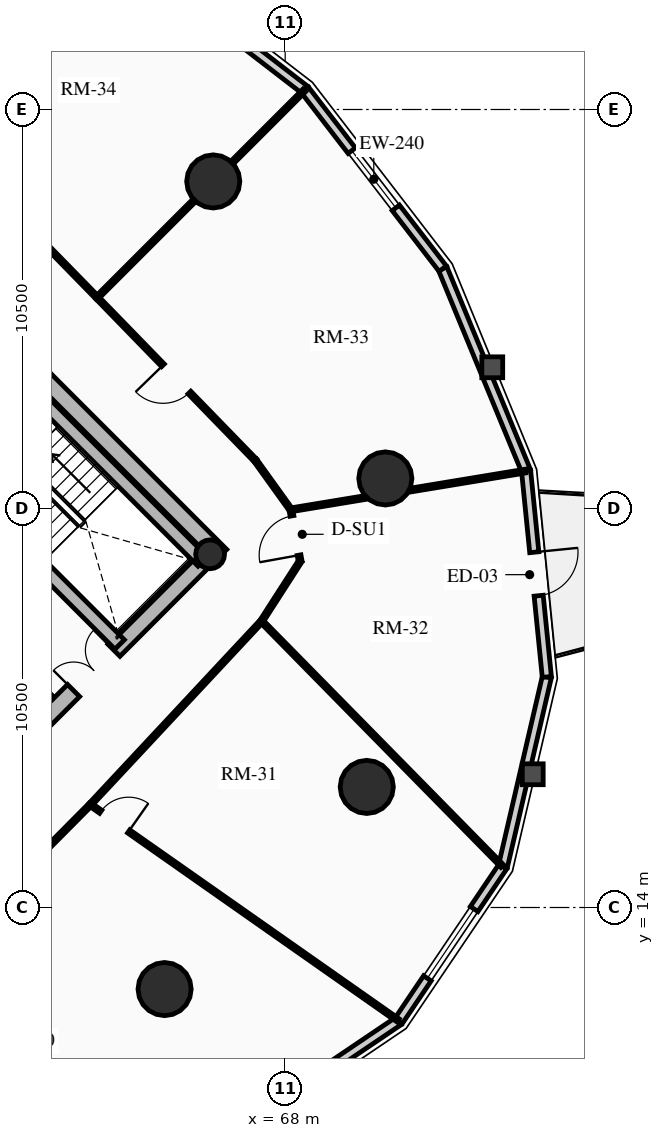
"""IFC4 building model, lengths in metres.
Left out: names, types, materials, properties, quantities, classifications, styles, units other than length and angle.
Written with IfcOpenShell. Run it as: python <this file> out.ifc"""

import sys

from ifc_helpers import new_model, si_unit, direction, frame, frame_2d, origin, origin_2d, place, context, subcontext, project, spatial, rectangle, circle, hollow_circle, extrude, source, transform, mapped, element, fill, save


model = new_model("IFC4")
c1 = context("Model", 3, precision=1e-05, world=origin(), true_north=direction((0.0, 1.0)))
c2 = subcontext(c1, "Body", "Model", "MODEL_VIEW")
j1 = project(units=[si_unit("LENGTHUNIT", "METRE"), si_unit("PLANEANGLEUNIT", "RADIAN")], contexts=[c1])
p1 = place(None, origin())
s1 = spatial("IfcSite", under=j1, at=p1, CompositionType="ELEMENT")
p2 = place(p1, origin())
s2 = spatial("IfcBuilding", under=s1, at=p2, CompositionType="ELEMENT")
p3 = place(p2, frame((0.0, 0.0, 96.34)))
s3 = spatial("IfcBuildingStorey", under=s2, at=p3, CompositionType="ELEMENT", Elevation=96.34)
p4 = place(p3, frame((66.303, 23.263, 0.0), z_axis=(0.0, 0.0, 1.0), x_axis=(-0.707106781187, 0.707106781187, 0.0)))
e1 = element("IfcWall", 1, at=p4, inside=s3, PredefinedType="SHEAR", context=c2, shape_type="SweptSolid", body=[
    extrude(rectangle(XDim=14.2, YDim=0.45, at=frame_2d((7.1, 0.0))), origin(), (0.0, 0.0, 1.0), 2.91),
])
p5 = place(p3, frame((58.578, 15.856, 0.0), z_axis=(0.0, 0.0, 1.0), x_axis=(0.707106781187, 0.707106781187, 0.0)))
e2 = element("IfcWall", 2, at=p5, inside=s3, PredefinedType="SHEAR", context=c2, shape_type="SweptSolid", body=[
    extrude(rectangle(XDim=10.7, YDim=0.45, at=frame_2d((5.35, 0.0))), origin(), (0.0, 0.0, 1.0), 2.91),
])
m1 = source(origin(), c2, "Body", "SweptSolid", [
    extrude(rectangle(XDim=1.5, YDim=2.02, at=frame_2d((0.75, 1.01))), frame((0.0, 0.235, 0.0), z_axis=(0.0, -1.0, 0.0), x_axis=(1.0, 0.0, 0.0)), (0.0, 0.0, 1.0), 0.47),
])
p6 = place(p5, frame((5.45, 0.0, 0.0)))
e3 = element("IfcOpeningElement", 3, at=p6, cuts=e2, PredefinedType="OPENING", context=c2, shape_type="MappedRepresentation", body=[
    mapped(m1, transform((0.0, 0.0, 0.0), x_axis=(1.0, 0.0, 0.0), y_axis=(0.0, 1.0, 0.0), z_axis=(0.0, 0.0, 1.0), scale=1.0)),
])
p7 = place(p3, frame((63.645, 20.922, 0.0), z_axis=(0.0, 0.0, 1.0), x_axis=(-0.707106781187, 0.707106781187, 0.0)))
e4 = element("IfcWall", 4, at=p7, inside=s3, PredefinedType="SHEAR", context=c2, shape_type="SweptSolid", body=[
    extrude(rectangle(XDim=13.75, YDim=0.35, at=frame_2d((6.875, 0.0))), origin(), (0.0, 0.0, 1.0), 2.91),
])
m2 = source(origin(), c2, "Body", "SweptSolid", [
    extrude(rectangle(XDim=1.1, YDim=2.015, at=frame_2d((0.55, 1.007))), frame((0.0, 0.185, 0.0), z_axis=(0.0, -1.0, 0.0), x_axis=(1.0, 0.0, 0.0)), (0.0, 0.0, 1.0), 0.37),
])
p8 = place(p7, frame((10.0, 0.0, 0.0)))
e5 = element("IfcOpeningElement", 5, at=p8, cuts=e4, PredefinedType="OPENING", context=c2, shape_type="MappedRepresentation", body=[
    mapped(m2, transform((0.0, 0.0, 0.0), x_axis=(1.0, 0.0, 0.0), y_axis=(0.0, 1.0, 0.0), z_axis=(0.0, 0.0, 1.0), scale=1.0)),
])
p9 = place(p7, frame((12.0, 0.0, 0.0)))
e6 = element("IfcOpeningElement", 6, at=p9, cuts=e4, PredefinedType="OPENING", context=c2, shape_type="MappedRepresentation", body=[
    mapped(m2, transform((0.0, 0.0, 0.0), x_axis=(1.0, 0.0, 0.0), y_axis=(0.0, 1.0, 0.0), z_axis=(0.0, 0.0, 1.0), scale=1.0)),
])
m3 = source(origin(), c2, "Body", "SweptSolid", [
    extrude(rectangle(XDim=1.15, YDim=2.02, at=frame_2d((0.575, 1.01))), frame((0.0, 0.185, 0.0), z_axis=(0.0, -1.0, 0.0), x_axis=(1.0, 0.0, 0.0)), (0.0, 0.0, 1.0), 0.37),
])
p10 = place(p7, frame((5.305, 0.0, 0.0)))
e7 = element("IfcOpeningElement", 7, at=p10, cuts=e4, PredefinedType="OPENING", context=c2, shape_type="MappedRepresentation", body=[
    mapped(m3, transform((0.0, 0.0, 0.0), x_axis=(1.0, 0.0, 0.0), y_axis=(0.0, 1.0, 0.0), z_axis=(0.0, 0.0, 1.0), scale=1.0)),
])
p11 = place(p3, frame((65.83, 23.107, 0.0), z_axis=(0.0, 0.0, 1.0), x_axis=(-0.707088616009, 0.707124945897, 0.0)))
e8 = element("IfcWall", 8, at=p11, inside=s3, PredefinedType="SHEAR", context=c2, shape_type="SweptSolid", body=[
    extrude(rectangle(XDim=6.72, YDim=0.35, at=frame_2d((3.36, 0.0))), origin(), (0.0, 0.0, 1.0), 2.91),
])
p12 = place(p3, frame((66.024, 23.294, 0.0), z_axis=(0.0, 0.0, 1.0), x_axis=(0.707106781187, 0.707106781187, 0.0)))
e9 = element("IfcColumn", 9, at=p12, inside=s3, PredefinedType="COLUMN", context=c2, shape_type="SweptSolid", body=[
    extrude(hollow_circle(Radius=0.38, WallThickness=0.032, at=origin_2d()), origin(), (0.0, 0.0, 1.0), 2.91),
])
for number, where, z_axis, x_axis in (
    (10, (66.107, 33.107, 0.0), (0.0, 0.0, 1.0), (1.0, 0.0, 0.0)),
    (11, (64.827, 11.854, 0.0), (0.0, 0.0, 1.0), (1.0, 0.0, 0.0)),
    (12, (70.146, 17.173, 0.0), (0.0, 0.0, 1.0), (1.0, 0.0, 0.0)),
    (13, (70.635, 25.291, 0.0), (0.0, 0.0, 1.0), (1.0, 0.0, 0.0)),
):
    element("IfcColumn", number, at=place(p3, frame(where, z_axis=z_axis, x_axis=x_axis)), inside=s3, PredefinedType="USERDEFINED", context=c2, shape_type="SweptSolid", body=[
        extrude(circle(Radius=0.7, at=origin_2d()), origin(), (0.0, 0.0, 1.0), 2.91),
    ])
p13 = place(p3, frame((63.811, 39.145, 0.0), z_axis=(0.0, 0.0, 1.0), x_axis=(0.791982052206, -0.61054437102, 0.0)))
e14 = element("IfcWall", 14, at=p13, inside=s3, PredefinedType="SOLIDWALL", context=c2, shape_type="SweptSolid", body=[
    extrude(rectangle(XDim=5.942, YDim=0.24, at=frame_2d((2.971, 0.0))), origin(), (0.0, 0.0, 1.0), 2.179),
])
p14 = place(p3, frame((70.985, 11.015, 0.0), z_axis=(0.0, 0.0, 1.0), x_axis=(-0.828781148131, -0.559572880421, 0.0)))
e15 = element("IfcWall", 15, at=p14, inside=s3, PredefinedType="SOLIDWALL", context=c2, shape_type="SweptSolid", body=[
    extrude(rectangle(XDim=4.905, YDim=0.24, at=frame_2d((2.452, 0.0))), origin(), (0.0, 0.0, 1.0), 2.179),
])
p15 = place(p3, frame((73.729, 15.08, 0.0), z_axis=(0.0, 0.0, 1.0), x_axis=(-0.559572880421, -0.828781148131, 0.0)))
e16 = element("IfcWall", 16, at=p15, inside=s3, PredefinedType="SOLIDWALL", context=c2, shape_type="SweptSolid", body=[
    extrude(rectangle(XDim=4.905, YDim=0.24, at=frame_2d((2.452, 0.0))), origin(), (0.0, 0.0, 1.0), 2.179),
])
m4 = source(origin(), c2, "Body", "SweptSolid", [
    extrude(rectangle(XDim=2.2, YDim=1.35, at=frame_2d((1.1, 0.675))), frame((0.0, 0.13, 0.0), z_axis=(0.0, -1.0, 0.0), x_axis=(1.0, 0.0, 0.0)), (0.0, 0.0, 1.0), 0.26),
])
p16 = place(p15, frame((1.352, 0.0, 0.65)))
e17 = element("IfcOpeningElement", 17, at=p16, cuts=e16, PredefinedType="OPENING", context=c2, shape_type="MappedRepresentation", body=[
    mapped(m4, transform((0.0, 0.0, 0.0), x_axis=(1.0, 0.0, 0.0), y_axis=(0.0, 1.0, 0.0), z_axis=(0.0, 0.0, 1.0), scale=1.0)),
])
p17 = place(p3, frame((74.885, 20.067, 0.0), z_axis=(0.0, 0.0, 1.0), x_axis=(-0.225834725257, -0.974165631126, 0.0)))
e18 = element("IfcWall", 18, at=p17, inside=s3, PredefinedType="SOLIDWALL", context=c2, shape_type="SweptSolid", body=[
    extrude(rectangle(XDim=5.119, YDim=0.24, at=frame_2d((2.56, 0.0))), origin(), (0.0, 0.0, 1.0), 2.179),
])
p18 = place(p3, frame((74.339, 25.487, 0.0), z_axis=(0.0, 0.0, 1.0), x_axis=(0.10015591906, -0.994971754311, 0.0)))
e19 = element("IfcWall", 19, at=p18, inside=s3, PredefinedType="SOLIDWALL", context=c2, shape_type="SweptSolid", body=[
    extrude(rectangle(XDim=5.448, YDim=0.24, at=frame_2d((2.724, 0.0))), origin(), (0.0, 0.0, 1.0), 2.179),
])
m5 = source(origin(), c2, "Body", "SweptSolid", [
    extrude(rectangle(XDim=1.15, YDim=2.005, at=frame_2d((0.575, 1.002))), frame((0.0, 0.13, 0.0), z_axis=(0.0, -1.0, 0.0), x_axis=(1.0, 0.0, 0.0)), (0.0, 0.0, 1.0), 0.26),
])
p19 = place(p18, frame((2.149, 0.0, 0.0)))
e20 = element("IfcOpeningElement", 20, at=p19, cuts=e19, PredefinedType="OPENING", context=c2, shape_type="MappedRepresentation", body=[
    mapped(m5, transform((0.0, 0.0, 0.0), x_axis=(1.0, 0.0, 0.0), y_axis=(0.0, 1.0, 0.0), z_axis=(0.0, 0.0, 1.0), scale=1.0)),
])
p20 = place(p3, frame((72.145, 30.811, 0.0), z_axis=(0.0, 0.0, 1.0), x_axis=(0.381027003055, -0.924563909604, 0.0)))
e21 = element("IfcWall", 21, at=p20, inside=s3, PredefinedType="SOLIDWALL", context=c2, shape_type="SweptSolid", body=[
    extrude(rectangle(XDim=5.758, YDim=0.24, at=frame_2d((2.879, 0.0))), origin(), (0.0, 0.0, 1.0), 2.179),
])
p21 = place(p3, frame((68.517, 35.517, 0.0), z_axis=(0.0, 0.0, 1.0), x_axis=(0.61054437102, -0.791982052206, 0.0)))
e22 = element("IfcWall", 22, at=p21, inside=s3, PredefinedType="SOLIDWALL", context=c2, shape_type="SweptSolid", body=[
    extrude(rectangle(XDim=5.942, YDim=0.24, at=frame_2d((2.971, 0.0))), origin(), (0.0, 0.0, 1.0), 2.179),
])
m6 = source(origin(), c2, "Body", "SweptSolid", [
    extrude(rectangle(XDim=1.9, YDim=1.35, at=frame_2d((0.95, 0.675))), frame((0.0, 0.13, 0.0), z_axis=(0.0, -1.0, 0.0), x_axis=(1.0, 0.0, 0.0)), (0.0, 0.0, 1.0), 0.26),
])
p22 = place(p21, frame((2.021, 0.0, 0.65)))
e23 = element("IfcOpeningElement", 23, at=p22, cuts=e22, PredefinedType="OPENING", context=c2, shape_type="MappedRepresentation", body=[
    mapped(m6, transform((0.0, 0.0, 0.0), x_axis=(1.0, 0.0, 0.0), y_axis=(0.0, 1.0, 0.0), z_axis=(0.0, 0.0, 1.0), scale=1.0)),
])
p23 = place(p3, frame((61.835, 19.529, 0.0), z_axis=(0.0, 0.0, 1.0), x_axis=(-0.707174592913, 0.707038962956, 0.0)))
e24 = element("IfcWall", 24, at=p23, inside=s3, PredefinedType="PARTITIONING", context=c2, shape_type="SweptSolid", body=[
    extrude(rectangle(XDim=1.8, YDim=0.125, at=frame_2d((0.9, 0.0))), origin(), (0.0, 0.0, 1.0), 2.655),
])
m7 = source(origin(), c2, "Body", "SweptSolid", [
    extrude(rectangle(XDim=0.9, YDim=2.005, at=frame_2d((0.45, 1.002))), frame((0.0, 0.073, 0.0), z_axis=(0.0, -1.0, 0.0), x_axis=(1.0, 0.0, 0.0)), (0.0, 0.0, 1.0), 0.145),
])
p24 = place(p23, frame((0.42, 0.0, 0.0)))
e25 = element("IfcOpeningElement", 25, at=p24, cuts=e24, PredefinedType="OPENING", context=c2, shape_type="MappedRepresentation", body=[
    mapped(m7, transform((0.0, 0.0, 0.0), x_axis=(1.0, 0.0, 0.0), y_axis=(0.0, 1.0, 0.0), z_axis=(0.0, 0.0, 1.0), scale=1.0)),
])
p25 = place(p3, frame((63.051, 30.051, 0.0), z_axis=(0.0, 0.0, 1.0), x_axis=(-0.698911483116, 0.715208178622, 0.0)))
e26 = element("IfcWall", 26, at=p25, inside=s3, PredefinedType="MOVABLE", context=c2, shape_type="SweptSolid", body=[
    extrude(rectangle(XDim=6.082, YDim=0.1, at=frame_2d((3.041, 0.0))), origin(), (0.0, 0.0, 1.0), 2.225),
])
p26 = place(p3, frame((60.549, 14.366, 0.0), z_axis=(0.0, 0.0, 1.0), x_axis=(0.704402344516, 0.709800913666, 0.0)))
e27 = element("IfcWall", 27, at=p26, inside=s3, PredefinedType="MOVABLE", context=c2, shape_type="SweptSolid", body=[
    extrude(rectangle(XDim=3.301, YDim=0.1, at=frame_2d((1.651, 0.0))), origin(), (0.0, 0.0, 1.0), 2.225),
])
p27 = place(p3, frame((62.875, 16.709, 0.0), z_axis=(0.0, 0.0, 1.0), x_axis=(0.682290572861, 0.731081099595, 0.0)))
e28 = element("IfcWall", 28, at=p27, inside=s3, PredefinedType="MOVABLE", context=c2, shape_type="SweptSolid", body=[
    extrude(rectangle(XDim=6.6, YDim=0.1, at=frame_2d((3.3, 0.0))), origin(), (0.0, 0.0, 1.0), 2.225),
])
p28 = place(p3, frame((67.378, 21.534, 0.0), z_axis=(0.0, 0.0, 1.0), x_axis=(0.54130306552, 0.840827563332, 0.0)))
e29 = element("IfcWall", 29, at=p28, inside=s3, PredefinedType="MOVABLE", context=c2, shape_type="SweptSolid", body=[
    extrude(rectangle(XDim=1.877, YDim=0.1, at=frame_2d((0.938, 0.0))), origin(), (0.0, 0.0, 1.0), 2.225),
])
p29 = place(p3, frame((68.394, 23.113, 0.0), z_axis=(0.0, 0.0, 1.0), x_axis=(-0.177868948753, 0.984054184011, 0.0)))
e30 = element("IfcWall", 30, at=p29, inside=s3, PredefinedType="MOVABLE", context=c2, shape_type="SweptSolid", body=[
    extrude(rectangle(XDim=1.374, YDim=0.1, at=frame_2d((0.687, 0.0))), origin(), (0.0, 0.0, 1.0), 2.225),
])
m8 = source(origin(), c2, "Body", "SweptSolid", [
    extrude(rectangle(XDim=1.05, YDim=2.015, at=frame_2d((0.525, 1.007))), frame((0.0, 0.06, 0.0), z_axis=(0.0, -1.0, 0.0), x_axis=(1.0, 0.0, 0.0)), (0.0, 0.0, 1.0), 0.12),
])
p30 = place(p29, frame((0.162, 0.0, 0.0)))
e31 = element("IfcOpeningElement", 31, at=p30, cuts=e30, PredefinedType="OPENING", context=c2, shape_type="MappedRepresentation", body=[
    mapped(m8, transform((0.0, 0.0, 0.0), x_axis=(1.0, 0.0, 0.0), y_axis=(0.0, 1.0, 0.0), z_axis=(0.0, 0.0, 1.0), scale=1.0)),
])
p31 = place(p3, frame((68.15, 24.465, 0.0), z_axis=(0.0, 0.0, 1.0), x_axis=(-0.58376767291, 0.811920749868, 0.0)))
e32 = element("IfcWall", 32, at=p31, inside=s3, PredefinedType="MOVABLE", context=c2, shape_type="SweptSolid", body=[
    extrude(rectangle(XDim=1.605, YDim=0.1, at=frame_2d((0.803, 0.0))), origin(), (0.0, 0.0, 1.0), 2.225),
])
p32 = place(p3, frame((67.213, 25.768, 0.0), z_axis=(0.0, 0.0, 1.0), x_axis=(-0.696916079748, 0.717152687918, 0.0)))
e33 = element("IfcWall", 33, at=p32, inside=s3, PredefinedType="MOVABLE", context=c2, shape_type="SweptSolid", body=[
    extrude(rectangle(XDim=5.972, YDim=0.1, at=frame_2d((2.986, 0.0))), origin(), (0.0, 0.0, 1.0), 2.655),
])
m9 = source(origin(), c2, "Body", "SweptSolid", [
    extrude(rectangle(XDim=1.0, YDim=2.015, at=frame_2d((0.5, 1.007))), frame((0.0, 0.06, 0.0), z_axis=(0.0, -1.0, 0.0), x_axis=(1.0, 0.0, 0.0)), (0.0, 0.0, 1.0), 0.12),
])
p33 = place(p32, frame((2.486, 0.0, 0.0)))
e34 = element("IfcOpeningElement", 34, at=p33, cuts=e33, PredefinedType="OPENING", context=c2, shape_type="MappedRepresentation", body=[
    mapped(m9, transform((0.0, 0.0, 0.0), x_axis=(1.0, 0.0, 0.0), y_axis=(0.0, 1.0, 0.0), z_axis=(0.0, 0.0, 1.0), scale=1.0)),
])
p34 = place(p3, frame((63.051, 30.051, 0.0), z_axis=(0.0, 0.0, 1.0), x_axis=(0.707106781187, 0.707106781187, 0.0)))
e35 = element("IfcWall", 35, at=p34, inside=s3, PredefinedType="MOVABLE", context=c2, shape_type="SweptSolid", body=[
    extrude(rectangle(XDim=7.711, YDim=0.1, at=frame_2d((3.855, 0.0))), origin(), (0.0, 0.0, 1.0), 2.179),
])
p35 = place(p3, frame((67.378, 21.534, 0.0), z_axis=(0.0, 0.0, 1.0), x_axis=(0.700878918497, -0.713280268622, 0.0)))
e36 = element("IfcWall", 36, at=p35, inside=s3, PredefinedType="MOVABLE", context=c2, shape_type="SweptSolid", body=[
    extrude(rectangle(XDim=9.036, YDim=0.1, at=frame_2d((4.518, 0.0))), origin(), (0.0, 0.0, 1.0), 2.179),
])
p36 = place(p3, frame((68.15, 24.465, 0.0), z_axis=(0.0, 0.0, 1.0), x_axis=(0.986627164528, 0.162993368625, 0.0)))
e37 = element("IfcWall", 37, at=p36, inside=s3, PredefinedType="MOVABLE", context=c2, shape_type="SweptSolid", body=[
    extrude(rectangle(XDim=6.254, YDim=0.1, at=frame_2d((3.127, 0.0))), origin(), (0.0, 0.0, 1.0), 2.179),
])
p37 = place(p3, frame((62.875, 16.709, 0.0), z_axis=(0.0, 0.0, 1.0), x_axis=(0.818628370173, -0.574323594804, 0.0)))
e38 = element("IfcWall", 38, at=p37, inside=s3, PredefinedType="MOVABLE", context=c2, shape_type="SweptSolid", body=[
    extrude(rectangle(XDim=9.889, YDim=0.1, at=frame_2d((4.945, 0.0))), origin(), (0.0, 0.0, 1.0), 2.179),
])
m10 = source(origin(), c2, "Body", "SweptSolid", [
    extrude(rectangle(XDim=0.9, YDim=2.005, at=frame_2d((0.45, 1.002))), frame((0.0, 0.06, 0.0), z_axis=(0.0, -1.0, 0.0), x_axis=(1.0, 0.0, 0.0)), (0.0, 0.0, 1.0), 0.12),
])
p38 = place(p37, frame((0.33, 0.0, 0.0)))
e39 = element("IfcOpeningElement", 39, at=p38, cuts=e38, PredefinedType="OPENING", context=c2, shape_type="MappedRepresentation", body=[
    mapped(m10, transform((0.0, 0.0, 0.0), x_axis=(1.0, 0.0, 0.0), y_axis=(0.0, 1.0, 0.0), z_axis=(0.0, 0.0, 1.0), scale=1.0)),
])
m11 = source(origin(), c2, "Body", "SweptSolid", [
    extrude(rectangle(XDim=2.2, YDim=1.35, at=frame_2d((1.1, 0.675))), frame((0.0, 0.03, 0.0), z_axis=(0.0, -1.0, 0.0), x_axis=(1.0, 0.0, 0.0)), (0.0, 0.0, 1.0), 0.06),
])
p39 = place(p16, origin())
e40 = element("IfcWindow", 40, at=p39, inside=s3, PartitioningType="DOUBLE_PANEL_VERTICAL", PredefinedType="WINDOW", context=c2, shape_type="MappedRepresentation", body=[
    mapped(m11, transform((0.0, 0.0, 0.0), x_axis=(1.0, 0.0, 0.0), y_axis=(0.0, 1.0, 0.0), z_axis=(0.0, 0.0, 1.0), scale=1.0)),
])
fill(e17, e40)
m12 = source(origin(), c2, "Body", "SweptSolid", [
    extrude(rectangle(XDim=1.15, YDim=2.005, at=frame_2d((0.575, 1.002))), frame((0.0, 0.025, 0.0), z_axis=(0.0, -1.0, 0.0), x_axis=(1.0, 0.0, 0.0)), (0.0, 0.0, 1.0), 0.05),
])
p40 = place(p19, origin())
e41 = element("IfcDoor", 41, at=p40, inside=s3, OperationType="SINGLE_SWING_LEFT", PredefinedType="DOOR", context=c2, shape_type="MappedRepresentation", body=[
    mapped(m12, transform((0.0, 0.0, 0.0), x_axis=(1.0, 0.0, 0.0), y_axis=(0.0, 1.0, 0.0), z_axis=(0.0, 0.0, 1.0), scale=1.0)),
])
fill(e20, e41)
m13 = source(origin(), c2, "Body", "SweptSolid", [
    extrude(rectangle(XDim=1.9, YDim=1.35, at=frame_2d((0.95, 0.675))), frame((0.0, 0.03, 0.0), z_axis=(0.0, -1.0, 0.0), x_axis=(1.0, 0.0, 0.0)), (0.0, 0.0, 1.0), 0.06),
])
p41 = place(p22, origin())
e42 = element("IfcWindow", 42, at=p41, inside=s3, PartitioningType="DOUBLE_PANEL_VERTICAL", PredefinedType="WINDOW", context=c2, shape_type="MappedRepresentation", body=[
    mapped(m13, transform((0.0, 0.0, 0.0), x_axis=(1.0, 0.0, 0.0), y_axis=(0.0, 1.0, 0.0), z_axis=(0.0, 0.0, 1.0), scale=1.0)),
])
fill(e23, e42)
m14 = source(origin(), c2, "Body", "SweptSolid", [
    extrude(rectangle(XDim=1.5, YDim=2.02, at=frame_2d((0.75, 1.01))), frame((0.0, 0.025, 0.0), z_axis=(0.0, -1.0, 0.0), x_axis=(1.0, 0.0, 0.0)), (0.0, 0.0, 1.0), 0.05),
])
p42 = place(p6, origin())
e43 = element("IfcDoor", 43, at=p42, inside=s3, OperationType="DOUBLE_DOOR_SINGLE_SWING", PredefinedType="DOOR", context=c2, shape_type="MappedRepresentation", body=[
    mapped(m14, transform((0.0, 0.0, 0.0), x_axis=(1.0, 0.0, 0.0), y_axis=(0.0, 1.0, 0.0), z_axis=(0.0, 0.0, 1.0), scale=1.0)),
])
fill(e3, e43)
m15 = source(origin(), c2, "Body", "SweptSolid", [
    extrude(rectangle(XDim=0.9, YDim=2.005, at=frame_2d((0.45, 1.002))), frame((0.0, 0.025, 0.0), z_axis=(0.0, -1.0, 0.0), x_axis=(1.0, 0.0, 0.0)), (0.0, 0.0, 1.0), 0.05),
])
p43 = place(p38, origin())
e44 = element("IfcDoor", 44, at=p43, inside=s3, OperationType="SINGLE_SWING_RIGHT", PredefinedType="DOOR", context=c2, shape_type="MappedRepresentation", body=[
    mapped(m15, transform((0.0, 0.0, 0.0), x_axis=(1.0, 0.0, 0.0), y_axis=(0.0, 1.0, 0.0), z_axis=(0.0, 0.0, 1.0), scale=1.0)),
])
fill(e39, e44)
m16 = source(origin(), c2, "Body", "SweptSolid", [
    extrude(rectangle(XDim=1.05, YDim=2.015, at=frame_2d((0.525, 1.007))), frame((0.0, 0.025, 0.0), z_axis=(0.0, -1.0, 0.0), x_axis=(1.0, 0.0, 0.0)), (0.0, 0.0, 1.0), 0.05),
])
p44 = place(p30, origin())
e45 = element("IfcDoor", 45, at=p44, inside=s3, OperationType="SINGLE_SWING_LEFT", PredefinedType="DOOR", context=c2, shape_type="MappedRepresentation", body=[
    mapped(m16, transform((0.0, 0.0, 0.0), x_axis=(1.0, 0.0, 0.0), y_axis=(0.0, 1.0, 0.0), z_axis=(0.0, 0.0, 1.0), scale=1.0)),
])
fill(e31, e45)
m17 = source(origin(), c2, "Body", "SweptSolid", [
    extrude(rectangle(XDim=1.0, YDim=2.015, at=frame_2d((0.5, 1.007))), frame((0.0, 0.025, 0.0), z_axis=(0.0, -1.0, 0.0), x_axis=(1.0, 0.0, 0.0)), (0.0, 0.0, 1.0), 0.05),
])
p45 = place(p33, origin())
e46 = element("IfcDoor", 46, at=p45, inside=s3, OperationType="SINGLE_SWING_RIGHT", PredefinedType="DOOR", context=c2, shape_type="MappedRepresentation", body=[
    mapped(m17, transform((0.0, 0.0, 0.0), x_axis=(1.0, 0.0, 0.0), y_axis=(0.0, 1.0, 0.0), z_axis=(0.0, 0.0, 1.0), scale=1.0)),
])
fill(e34, e46)
save(model, sys.argv[1])
